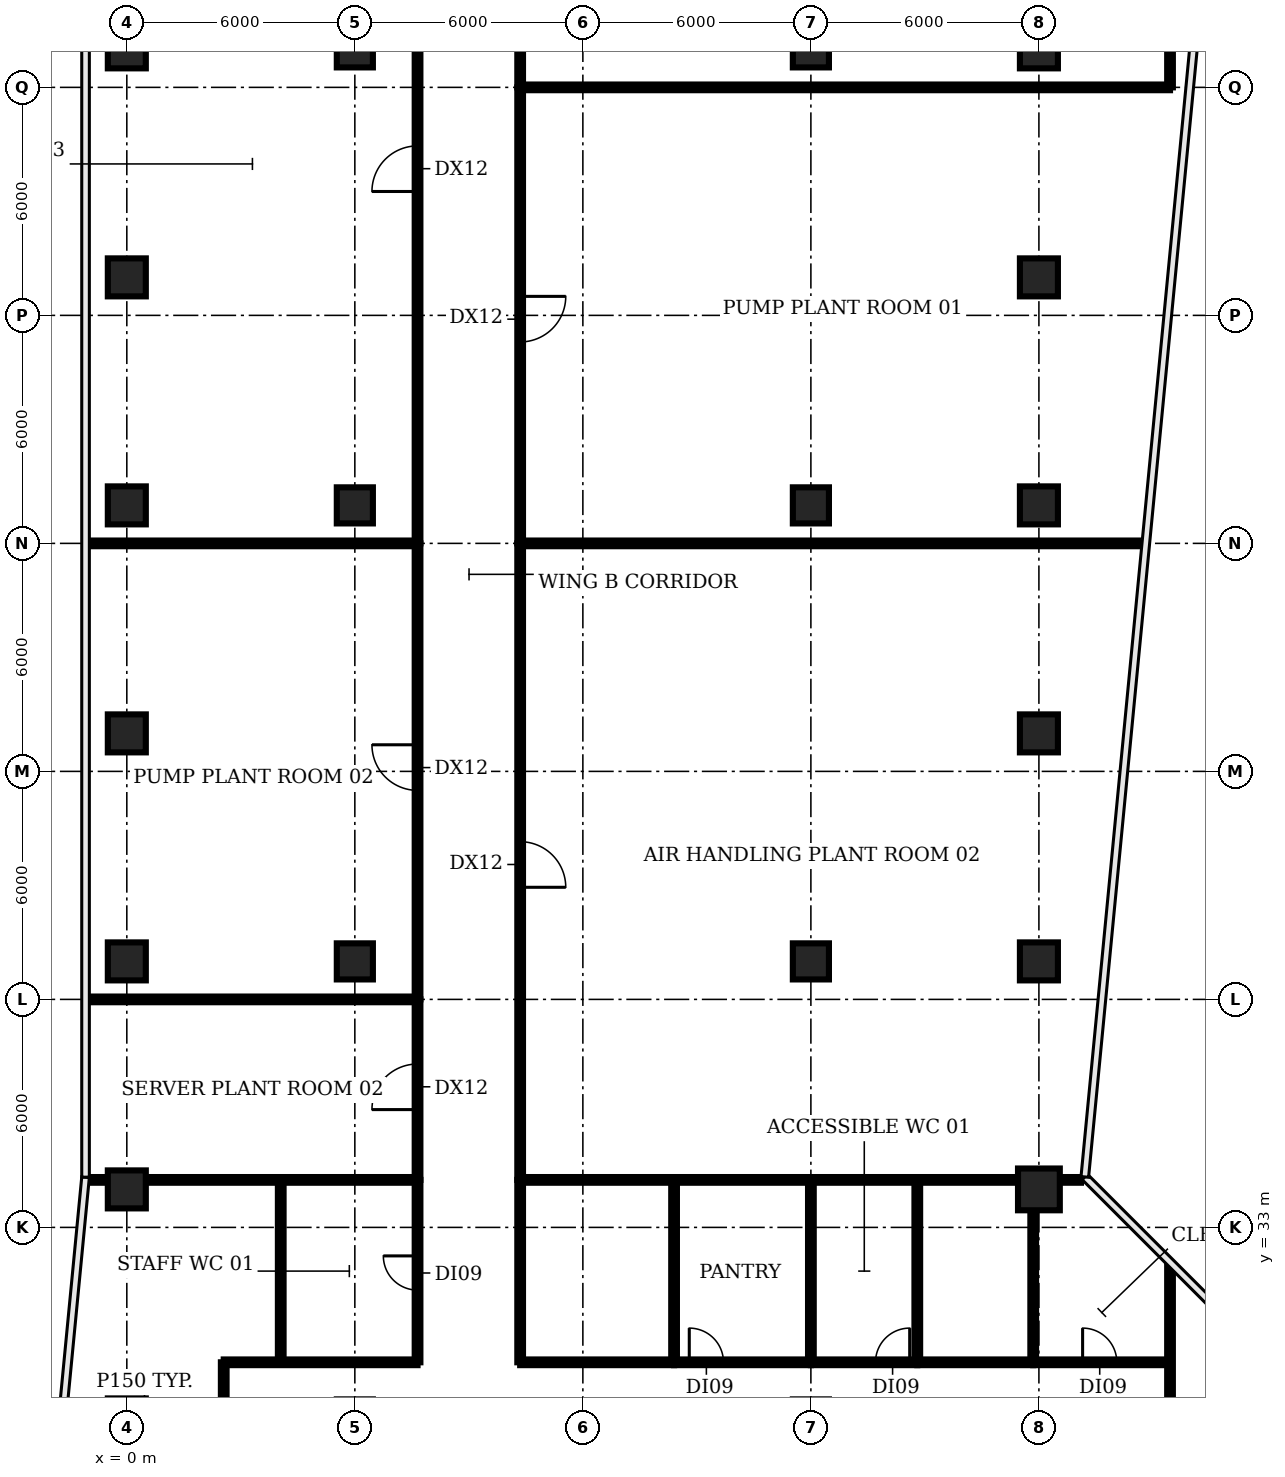
"""IFC4 building model, lengths in metres.
Left out: names, types, materials, properties, quantities, classifications, styles, units other than length and angle.
Written with IfcOpenShell. Run it as: python <this file> out.ifc"""

import sys

from ifc_helpers import new_model, si_unit, direction, frame, frame_2d, origin, origin_2d, place, context, subcontext, project, spatial, rectangle, circle, extrude, element, fill, save


model = new_model("IFC4")
c1 = context("Model", 3, precision=1e-05, world=origin(), true_north=direction((0.0, 1.0)))
c2 = subcontext(c1, "Body", "Model", "MODEL_VIEW")
j1 = project(units=[si_unit("LENGTHUNIT", "METRE"), si_unit("PLANEANGLEUNIT", "RADIAN")], contexts=[c1])
p1 = place(None, origin())
s1 = spatial("IfcSite", under=j1, at=p1, CompositionType="ELEMENT")
p2 = place(p1, origin())
s2 = spatial("IfcBuilding", under=s1, at=p2, CompositionType="ELEMENT")
p3 = place(p2, frame((0.0, 0.0, 134.0)))
s3 = spatial("IfcBuildingStorey", under=s2, at=p3, CompositionType="ELEMENT", Elevation=134.0)
for number, where, z_axis, x_axis in (
    (1, (0.0, 34.0, 0.0), (0.0, 0.0, 1.0), (1.0, 0.0, 0.0)),
    (2, (0.0, 40.0, 0.0), (0.0, 0.0, 1.0), (1.0, 0.0, 0.0)),
    (3, (0.0, 46.0, 0.0), (0.0, 0.0, 1.0), (1.0, 0.0, 0.0)),
    (4, (0.0, 52.0, 0.0), (0.0, 0.0, 1.0), (1.0, 0.0, 0.0)),
    (5, (0.0, 58.0, 0.0), (0.0, 0.0, 1.0), (1.0, 0.0, 0.0)),
    (6, (0.0, 64.0, 0.0), (0.0, 0.0, 1.0), (1.0, 0.0, 0.0)),
):
    element("IfcColumn", number, at=place(p3, frame(where, z_axis=z_axis, x_axis=x_axis)), inside=s3, PredefinedType="COLUMN", context=c2, shape_type="SweptSolid", body=[
        extrude(rectangle(XDim=1.0, YDim=1.0, at=origin_2d()), origin(), (0.0, 0.0, 1.0), 3.2),
    ])
for number, where, z_axis, x_axis in (
    (7, (6.0, 40.0, 0.0), (0.0, 0.0, 1.0), (1.0, 0.0, 0.0)),
    (8, (6.0, 52.0, 0.0), (0.0, 0.0, 1.0), (1.0, 0.0, 0.0)),
    (9, (6.0, 64.0, 0.0), (0.0, 0.0, 1.0), (1.0, 0.0, 0.0)),
    (10, (18.0, 40.0, 0.0), (0.0, 0.0, 1.0), (1.0, 0.0, 0.0)),
    (11, (18.0, 52.0, 0.0), (0.0, 0.0, 1.0), (1.0, 0.0, 0.0)),
    (12, (18.0, 64.0, 0.0), (0.0, 0.0, 1.0), (1.0, 0.0, 0.0)),
):
    element("IfcColumn", number, at=place(p3, frame(where, z_axis=z_axis, x_axis=x_axis)), inside=s3, PredefinedType="COLUMN", context=c2, shape_type="SweptSolid", body=[
        extrude(rectangle(XDim=0.95, YDim=0.95, at=origin_2d()), origin(), (0.0, 0.0, 1.0), 3.2),
    ])
p4 = place(p3, frame((24.0, 34.0, 0.0), z_axis=(0.0, 0.0, 1.0), x_axis=(1.0, 0.0, 0.0)))
e13 = element("IfcColumn", 13, at=p4, inside=s3, PredefinedType="COLUMN", context=c2, shape_type="SweptSolid", body=[
    extrude(circle(Radius=0.55, at=origin_2d()), origin(), (0.0, 0.0, 1.0), 3.2),
])
for number, where, z_axis, x_axis in (
    (14, (24.0, 40.0, 0.0), (0.0, 0.0, 1.0), (1.0, 0.0, 0.0)),
    (15, (24.0, 46.0, 0.0), (0.0, 0.0, 1.0), (1.0, 0.0, 0.0)),
    (16, (24.0, 52.0, 0.0), (0.0, 0.0, 1.0), (1.0, 0.0, 0.0)),
    (17, (24.0, 58.0, 0.0), (0.0, 0.0, 1.0), (1.0, 0.0, 0.0)),
    (18, (24.0, 64.0, 0.0), (0.0, 0.0, 1.0), (1.0, 0.0, 0.0)),
):
    element("IfcColumn", number, at=place(p3, frame(where, z_axis=z_axis, x_axis=x_axis)), inside=s3, PredefinedType="COLUMN", context=c2, shape_type="SweptSolid", body=[
        extrude(rectangle(XDim=1.0, YDim=1.0, at=origin_2d()), origin(), (0.0, 0.0, 1.0), 3.2),
    ])
p5 = place(p3, frame((-0.981, 34.25, 0.0), z_axis=(0.0, 0.0, 1.0), x_axis=(1.0, 0.0, 0.0)))
e19 = element("IfcWall", 19, at=p5, inside=s3, PredefinedType="PARTITIONING", context=c2, shape_type="SweptSolid", body=[
    extrude(rectangle(XDim=8.631, YDim=0.15, at=frame_2d((4.315, 0.0))), origin(), (0.0, 0.0, 1.0), 2.78),
])
for number, where, z_axis, x_axis in (
    (20, (-1.04, 39.0, 0.0), (0.0, 0.0, 1.0), (1.0, 0.0, 0.0)),
    (21, (-1.04, 51.0, 0.0), (0.0, 0.0, 1.0), (1.0, 0.0, 0.0)),
):
    element("IfcWall", number, at=place(p3, frame(where, z_axis=z_axis, x_axis=x_axis)), inside=s3, PredefinedType="PARTITIONING", context=c2, shape_type="SweptSolid", body=[
        extrude(rectangle(XDim=8.69, YDim=0.15, at=frame_2d((4.345, 0.0))), origin(), (0.0, 0.0, 1.0), 2.78),
    ])
p6 = place(p3, frame((2.55, 28.25, 0.0), z_axis=(0.0, 0.0, 1.0), x_axis=(0.0, 1.0, 0.0)))
e22 = element("IfcWall", 22, at=p6, inside=s3, PredefinedType="PARTITIONING", context=c2, shape_type="SweptSolid", body=[
    extrude(rectangle(XDim=1.2, YDim=0.15, at=frame_2d((0.6, 0.0))), origin(), (0.0, 0.0, 1.0), 2.78),
])
p7 = place(p3, frame((2.55, 29.45, 0.0), z_axis=(0.0, 0.0, 1.0), x_axis=(1.0, 0.0, 0.0)))
e23 = element("IfcWall", 23, at=p7, inside=s3, PredefinedType="PARTITIONING", context=c2, shape_type="SweptSolid", body=[
    extrude(rectangle(XDim=5.1, YDim=0.15, at=frame_2d((2.55, 0.0))), origin(), (0.0, 0.0, 1.0), 2.78),
])
p8 = place(p3, frame((4.05, 29.45, 0.0), z_axis=(0.0, 0.0, 1.0), x_axis=(0.0, 1.0, 0.0)))
e24 = element("IfcWall", 24, at=p8, inside=s3, PredefinedType="PARTITIONING", context=c2, shape_type="SweptSolid", body=[
    extrude(rectangle(XDim=4.8, YDim=0.15, at=frame_2d((2.4, 0.0))), origin(), (0.0, 0.0, 1.0), 2.78),
])
p9 = place(p3, frame((7.65, 29.45, 0.0), z_axis=(0.0, 0.0, 1.0), x_axis=(0.0, 1.0, 0.0)))
e25 = element("IfcWall", 25, at=p9, inside=s3, PredefinedType="PARTITIONING", context=c2, shape_type="SweptSolid", body=[
    extrude(rectangle(XDim=4.8, YDim=0.15, at=frame_2d((2.4, 0.0))), origin(), (0.0, 0.0, 1.0), 2.78),
])
p10 = place(p9, frame((1.9, 0.0, 0.0)))
e26 = element("IfcOpeningElement", 26, at=p10, cuts=e25, PredefinedType="OPENING", context=c2, shape_type="SweptSolid", body=[
    extrude(rectangle(XDim=0.9, YDim=2.1, at=frame_2d((0.45, 1.05))), frame((0.0, 0.085, 0.0), z_axis=(0.0, -1.0, 0.0), x_axis=(1.0, 0.0, 0.0)), (0.0, 0.0, 1.0), 0.17),
])
p11 = place(p3, frame((7.65, 34.25, 0.0), z_axis=(0.0, 0.0, 1.0), x_axis=(0.0, 1.0, 0.0)))
e27 = element("IfcWall", 27, at=p11, inside=s3, PredefinedType="PARTITIONING", context=c2, shape_type="SweptSolid", body=[
    extrude(rectangle(XDim=4.75, YDim=0.15, at=frame_2d((2.375, 0.0))), origin(), (0.0, 0.0, 1.0), 2.78),
])
p12 = place(p11, frame((1.85, 0.0, 0.0)))
e28 = element("IfcOpeningElement", 28, at=p12, cuts=e27, PredefinedType="OPENING", context=c2, shape_type="SweptSolid", body=[
    extrude(rectangle(XDim=1.2, YDim=2.1, at=frame_2d((0.6, 1.05))), frame((0.0, 0.085, 0.0), z_axis=(0.0, -1.0, 0.0), x_axis=(1.0, 0.0, 0.0)), (0.0, 0.0, 1.0), 0.17),
])
p13 = place(p3, frame((7.65, 39.0, 0.0), z_axis=(0.0, 0.0, 1.0), x_axis=(0.0, 1.0, 0.0)))
e29 = element("IfcWall", 29, at=p13, inside=s3, PredefinedType="PARTITIONING", context=c2, shape_type="SweptSolid", body=[
    extrude(rectangle(XDim=12.0, YDim=0.15, at=frame_2d((6.0, 0.0))), origin(), (0.0, 0.0, 1.0), 2.78),
])
p14 = place(p13, frame((5.5, 0.0, 0.0)))
e30 = element("IfcOpeningElement", 30, at=p14, cuts=e29, PredefinedType="OPENING", context=c2, shape_type="SweptSolid", body=[
    extrude(rectangle(XDim=1.2, YDim=2.1, at=frame_2d((0.6, 1.05))), frame((0.0, 0.085, 0.0), z_axis=(0.0, -1.0, 0.0), x_axis=(1.0, 0.0, 0.0)), (0.0, 0.0, 1.0), 0.17),
])
p15 = place(p3, frame((7.65, 51.0, 0.0), z_axis=(0.0, 0.0, 1.0), x_axis=(0.0, 1.0, 0.0)))
e31 = element("IfcWall", 31, at=p15, inside=s3, PredefinedType="PARTITIONING", context=c2, shape_type="SweptSolid", body=[
    extrude(rectangle(XDim=19.96, YDim=0.15, at=frame_2d((9.98, 0.0))), origin(), (0.0, 0.0, 1.0), 2.78),
])
p16 = place(p15, frame((9.26, 0.0, 0.0)))
e32 = element("IfcOpeningElement", 32, at=p16, cuts=e31, PredefinedType="OPENING", context=c2, shape_type="SweptSolid", body=[
    extrude(rectangle(XDim=1.2, YDim=2.1, at=frame_2d((0.6, 1.05))), frame((0.0, 0.085, 0.0), z_axis=(0.0, -1.0, 0.0), x_axis=(1.0, 0.0, 0.0)), (0.0, 0.0, 1.0), 0.17),
])
p17 = place(p3, frame((10.35, 29.45, 0.0), z_axis=(0.0, 0.0, 1.0), x_axis=(0.0, 1.0, 0.0)))
e33 = element("IfcWall", 33, at=p17, inside=s3, PredefinedType="PARTITIONING", context=c2, shape_type="SweptSolid", body=[
    extrude(rectangle(XDim=4.8, YDim=0.15, at=frame_2d((2.4, 0.0))), origin(), (0.0, 0.0, 1.0), 2.78),
])
p18 = place(p3, frame((10.35, 29.45, 0.0), z_axis=(0.0, 0.0, 1.0), x_axis=(1.0, 0.0, 0.0)))
e34 = element("IfcWall", 34, at=p18, inside=s3, PredefinedType="PARTITIONING", context=c2, shape_type="SweptSolid", body=[
    extrude(rectangle(XDim=4.05, YDim=0.15, at=frame_2d((2.025, 0.0))), origin(), (0.0, 0.0, 1.0), 2.78),
])
p19 = place(p3, frame((10.35, 34.25, 0.0), z_axis=(0.0, 0.0, 1.0), x_axis=(1.0, 0.0, 0.0)))
e35 = element("IfcWall", 35, at=p19, inside=s3, PredefinedType="PARTITIONING", context=c2, shape_type="SweptSolid", body=[
    extrude(rectangle(XDim=14.756, YDim=0.15, at=frame_2d((7.378, 0.0))), origin(), (0.0, 0.0, 1.0), 2.78),
])
p20 = place(p3, frame((10.35, 51.0, 0.0), z_axis=(0.0, 0.0, 1.0), x_axis=(0.0, -1.0, 0.0)))
e36 = element("IfcWall", 36, at=p20, inside=s3, PredefinedType="PARTITIONING", context=c2, shape_type="SweptSolid", body=[
    extrude(rectangle(XDim=16.75, YDim=0.15, at=frame_2d((8.375, 0.0))), origin(), (0.0, 0.0, 1.0), 2.78),
])
p21 = place(p20, frame((7.85, 0.0, 0.0)))
e37 = element("IfcOpeningElement", 37, at=p21, cuts=e36, PredefinedType="OPENING", context=c2, shape_type="SweptSolid", body=[
    extrude(rectangle(XDim=1.2, YDim=2.1, at=frame_2d((0.6, 1.05))), frame((0.0, 0.085, 0.0), z_axis=(0.0, -1.0, 0.0), x_axis=(1.0, 0.0, 0.0)), (0.0, 0.0, 1.0), 0.17),
])
p22 = place(p3, frame((10.35, 51.0, 0.0), z_axis=(0.0, 0.0, 1.0), x_axis=(1.0, 0.0, 0.0)))
e38 = element("IfcWall", 38, at=p22, inside=s3, PredefinedType="PARTITIONING", context=c2, shape_type="SweptSolid", body=[
    extrude(rectangle(XDim=16.41, YDim=0.15, at=frame_2d((8.205, 0.0))), origin(), (0.0, 0.0, 1.0), 2.78),
])
p23 = place(p3, frame((10.35, 63.0, 0.0), z_axis=(0.0, 0.0, 1.0), x_axis=(0.0, -1.0, 0.0)))
e39 = element("IfcWall", 39, at=p23, inside=s3, PredefinedType="PARTITIONING", context=c2, shape_type="SweptSolid", body=[
    extrude(rectangle(XDim=12.0, YDim=0.15, at=frame_2d((6.0, 0.0))), origin(), (0.0, 0.0, 1.0), 2.78),
])
p24 = place(p23, frame((5.5, 0.0, 0.0)))
e40 = element("IfcOpeningElement", 40, at=p24, cuts=e39, PredefinedType="OPENING", context=c2, shape_type="SweptSolid", body=[
    extrude(rectangle(XDim=1.2, YDim=2.1, at=frame_2d((0.6, 1.05))), frame((0.0, 0.085, 0.0), z_axis=(0.0, -1.0, 0.0), x_axis=(1.0, 0.0, 0.0)), (0.0, 0.0, 1.0), 0.17),
])
p25 = place(p3, frame((10.35, 63.0, 0.0), z_axis=(0.0, 0.0, 1.0), x_axis=(1.0, 0.0, 0.0)))
e41 = element("IfcWall", 41, at=p25, inside=s3, PredefinedType="PARTITIONING", context=c2, shape_type="SweptSolid", body=[
    extrude(rectangle(XDim=17.1, YDim=0.15, at=frame_2d((8.55, 0.0))), origin(), (0.0, 0.0, 1.0), 2.78),
])
p26 = place(p3, frame((10.35, 70.91, 0.0), z_axis=(0.0, 0.0, 1.0), x_axis=(0.0, -1.0, 0.0)))
e42 = element("IfcWall", 42, at=p26, inside=s3, PredefinedType="PARTITIONING", context=c2, shape_type="SweptSolid", body=[
    extrude(rectangle(XDim=7.91, YDim=0.15, at=frame_2d((3.955, 0.0))), origin(), (0.0, 0.0, 1.0), 2.78),
])
p27 = place(p26, frame((3.21, 0.0, 0.0)))
e43 = element("IfcOpeningElement", 43, at=p27, cuts=e42, PredefinedType="OPENING", context=c2, shape_type="SweptSolid", body=[
    extrude(rectangle(XDim=1.2, YDim=2.1, at=frame_2d((0.6, 1.05))), frame((0.0, 0.085, 0.0), z_axis=(0.0, -1.0, 0.0), x_axis=(1.0, 0.0, 0.0)), (0.0, 0.0, 1.0), 0.17),
])
p28 = place(p3, frame((14.4, 29.45, 0.0), z_axis=(0.0, 0.0, 1.0), x_axis=(0.0, 1.0, 0.0)))
e44 = element("IfcWall", 44, at=p28, inside=s3, PredefinedType="PARTITIONING", context=c2, shape_type="SweptSolid", body=[
    extrude(rectangle(XDim=4.8, YDim=0.15, at=frame_2d((2.4, 0.0))), origin(), (0.0, 0.0, 1.0), 2.78),
])
p29 = place(p3, frame((14.4, 29.45, 0.0), z_axis=(0.0, 0.0, 1.0), x_axis=(1.0, 0.0, 0.0)))
e45 = element("IfcWall", 45, at=p29, inside=s3, PredefinedType="PARTITIONING", context=c2, shape_type="SweptSolid", body=[
    extrude(rectangle(XDim=3.6, YDim=0.15, at=frame_2d((1.8, 0.0))), origin(), (0.0, 0.0, 1.0), 2.78),
])
p30 = place(p29, frame((0.4, 0.0, 0.0)))
e46 = element("IfcOpeningElement", 46, at=p30, cuts=e45, PredefinedType="OPENING", context=c2, shape_type="SweptSolid", body=[
    extrude(rectangle(XDim=0.9, YDim=2.1, at=frame_2d((0.45, 1.05))), frame((0.0, 0.085, 0.0), z_axis=(0.0, -1.0, 0.0), x_axis=(1.0, 0.0, 0.0)), (0.0, 0.0, 1.0), 0.17),
])
p31 = place(p3, frame((18.0, 29.45, 0.0), z_axis=(0.0, 0.0, 1.0), x_axis=(0.0, 1.0, 0.0)))
e47 = element("IfcWall", 47, at=p31, inside=s3, PredefinedType="PARTITIONING", context=c2, shape_type="SweptSolid", body=[
    extrude(rectangle(XDim=4.8, YDim=0.15, at=frame_2d((2.4, 0.0))), origin(), (0.0, 0.0, 1.0), 2.78),
])
p32 = place(p3, frame((18.0, 29.45, 0.0), z_axis=(0.0, 0.0, 1.0), x_axis=(1.0, 0.0, 0.0)))
e48 = element("IfcWall", 48, at=p32, inside=s3, PredefinedType="PARTITIONING", context=c2, shape_type="SweptSolid", body=[
    extrude(rectangle(XDim=2.8, YDim=0.15, at=frame_2d((1.4, 0.0))), origin(), (0.0, 0.0, 1.0), 2.78),
])
p33 = place(p32, frame((1.7, 0.0, 0.0)))
e49 = element("IfcOpeningElement", 49, at=p33, cuts=e48, PredefinedType="OPENING", context=c2, shape_type="SweptSolid", body=[
    extrude(rectangle(XDim=0.9, YDim=2.1, at=frame_2d((0.45, 1.05))), frame((0.0, 0.085, 0.0), z_axis=(0.0, -1.0, 0.0), x_axis=(1.0, 0.0, 0.0)), (0.0, 0.0, 1.0), 0.17),
])
p34 = place(p3, frame((20.8, 29.45, 0.0), z_axis=(0.0, 0.0, 1.0), x_axis=(0.0, 1.0, 0.0)))
e50 = element("IfcWall", 50, at=p34, inside=s3, PredefinedType="PARTITIONING", context=c2, shape_type="SweptSolid", body=[
    extrude(rectangle(XDim=4.8, YDim=0.15, at=frame_2d((2.4, 0.0))), origin(), (0.0, 0.0, 1.0), 2.78),
])
p35 = place(p3, frame((20.8, 29.45, 0.0), z_axis=(0.0, 0.0, 1.0), x_axis=(1.0, 0.0, 0.0)))
e51 = element("IfcWall", 51, at=p35, inside=s3, PredefinedType="PARTITIONING", context=c2, shape_type="SweptSolid", body=[
    extrude(rectangle(XDim=3.05, YDim=0.15, at=frame_2d((1.525, 0.0))), origin(), (0.0, 0.0, 1.0), 2.78),
])
p36 = place(p3, frame((23.85, 29.45, 0.0), z_axis=(0.0, 0.0, 1.0), x_axis=(0.0, 1.0, 0.0)))
e52 = element("IfcWall", 52, at=p36, inside=s3, PredefinedType="PARTITIONING", context=c2, shape_type="SweptSolid", body=[
    extrude(rectangle(XDim=4.8, YDim=0.15, at=frame_2d((2.4, 0.0))), origin(), (0.0, 0.0, 1.0), 2.78),
])
p37 = place(p3, frame((23.85, 29.45, 0.0), z_axis=(0.0, 0.0, 1.0), x_axis=(1.0, 0.0, 0.0)))
e53 = element("IfcWall", 53, at=p37, inside=s3, PredefinedType="PARTITIONING", context=c2, shape_type="SweptSolid", body=[
    extrude(rectangle(XDim=3.6, YDim=0.15, at=frame_2d((1.8, 0.0))), origin(), (0.0, 0.0, 1.0), 2.78),
])
p38 = place(p37, frame((1.3, 0.0, 0.0)))
e54 = element("IfcOpeningElement", 54, at=p38, cuts=e53, PredefinedType="OPENING", context=c2, shape_type="SweptSolid", body=[
    extrude(rectangle(XDim=0.9, YDim=2.1, at=frame_2d((0.45, 1.05))), frame((0.0, 0.085, 0.0), z_axis=(0.0, -1.0, 0.0), x_axis=(1.0, 0.0, 0.0)), (0.0, 0.0, 1.0), 0.17),
])
p39 = place(p3, frame((27.45, 25.55, 0.0), z_axis=(0.0, 0.0, 1.0), x_axis=(0.0, 1.0, 0.0)))
e55 = element("IfcWall", 55, at=p39, inside=s3, PredefinedType="PARTITIONING", context=c2, shape_type="SweptSolid", body=[
    extrude(rectangle(XDim=6.47, YDim=0.15, at=frame_2d((3.235, 0.0))), origin(), (0.0, 0.0, 1.0), 2.78),
])
p40 = place(p3, frame((27.45, 63.0, 0.0), z_axis=(0.0, 0.0, 1.0), x_axis=(0.0, 1.0, 0.0)))
e56 = element("IfcWall", 56, at=p40, inside=s3, PredefinedType="PARTITIONING", context=c2, shape_type="SweptSolid", body=[
    extrude(rectangle(XDim=7.65, YDim=0.15, at=frame_2d((3.825, 0.0))), origin(), (0.0, 0.0, 1.0), 2.78),
])
p41 = place(p10, origin())
e57 = element("IfcDoor", 57, at=p41, inside=s3, OperationType="SINGLE_SWING_RIGHT", PredefinedType="DOOR", context=c2, shape_type="SweptSolid", body=[
    extrude(rectangle(XDim=0.9, YDim=2.1, at=frame_2d((0.45, 1.05))), frame((0.0, 0.025, 0.0), z_axis=(0.0, -1.0, 0.0), x_axis=(1.0, 0.0, 0.0)), (0.0, 0.0, 1.0), 0.05),
])
fill(e26, e57)
p42 = place(p12, origin())
e58 = element("IfcDoor", 58, at=p42, inside=s3, OperationType="SINGLE_SWING_LEFT", PredefinedType="DOOR", context=c2, shape_type="SweptSolid", body=[
    extrude(rectangle(XDim=1.2, YDim=2.1, at=frame_2d((0.6, 1.05))), frame((0.0, 0.025, 0.0), z_axis=(0.0, -1.0, 0.0), x_axis=(1.0, 0.0, 0.0)), (0.0, 0.0, 1.0), 0.05),
])
fill(e28, e58)
p43 = place(p14, origin())
e59 = element("IfcDoor", 59, at=p43, inside=s3, OperationType="SINGLE_SWING_RIGHT", PredefinedType="DOOR", context=c2, shape_type="SweptSolid", body=[
    extrude(rectangle(XDim=1.2, YDim=2.1, at=frame_2d((0.6, 1.05))), frame((0.0, 0.025, 0.0), z_axis=(0.0, -1.0, 0.0), x_axis=(1.0, 0.0, 0.0)), (0.0, 0.0, 1.0), 0.05),
])
fill(e30, e59)
p44 = place(p16, origin())
e60 = element("IfcDoor", 60, at=p44, inside=s3, OperationType="SINGLE_SWING_LEFT", PredefinedType="DOOR", context=c2, shape_type="SweptSolid", body=[
    extrude(rectangle(XDim=1.2, YDim=2.1, at=frame_2d((0.6, 1.05))), frame((0.0, 0.025, 0.0), z_axis=(0.0, -1.0, 0.0), x_axis=(1.0, 0.0, 0.0)), (0.0, 0.0, 1.0), 0.05),
])
fill(e32, e60)
p45 = place(p21, origin())
e61 = element("IfcDoor", 61, at=p45, inside=s3, OperationType="SINGLE_SWING_RIGHT", PredefinedType="DOOR", context=c2, shape_type="SweptSolid", body=[
    extrude(rectangle(XDim=1.2, YDim=2.1, at=frame_2d((0.6, 1.05))), frame((0.0, 0.025, 0.0), z_axis=(0.0, -1.0, 0.0), x_axis=(1.0, 0.0, 0.0)), (0.0, 0.0, 1.0), 0.05),
])
fill(e37, e61)
p46 = place(p24, origin())
e62 = element("IfcDoor", 62, at=p46, inside=s3, OperationType="SINGLE_SWING_LEFT", PredefinedType="DOOR", context=c2, shape_type="SweptSolid", body=[
    extrude(rectangle(XDim=1.2, YDim=2.1, at=frame_2d((0.6, 1.05))), frame((0.0, 0.025, 0.0), z_axis=(0.0, -1.0, 0.0), x_axis=(1.0, 0.0, 0.0)), (0.0, 0.0, 1.0), 0.05),
])
fill(e40, e62)
p47 = place(p30, origin())
e63 = element("IfcDoor", 63, at=p47, inside=s3, OperationType="SINGLE_SWING_LEFT", PredefinedType="DOOR", context=c2, shape_type="SweptSolid", body=[
    extrude(rectangle(XDim=0.9, YDim=2.1, at=frame_2d((0.45, 1.05))), frame((0.0, 0.025, 0.0), z_axis=(0.0, -1.0, 0.0), x_axis=(1.0, 0.0, 0.0)), (0.0, 0.0, 1.0), 0.05),
])
fill(e46, e63)
p48 = place(p33, origin())
e64 = element("IfcDoor", 64, at=p48, inside=s3, OperationType="SINGLE_SWING_RIGHT", PredefinedType="DOOR", context=c2, shape_type="SweptSolid", body=[
    extrude(rectangle(XDim=0.9, YDim=2.1, at=frame_2d((0.45, 1.05))), frame((0.0, 0.025, 0.0), z_axis=(0.0, -1.0, 0.0), x_axis=(1.0, 0.0, 0.0)), (0.0, 0.0, 1.0), 0.05),
])
fill(e49, e64)
p49 = place(p38, origin())
e65 = element("IfcDoor", 65, at=p49, inside=s3, OperationType="SINGLE_SWING_LEFT", PredefinedType="DOOR", context=c2, shape_type="SweptSolid", body=[
    extrude(rectangle(XDim=0.9, YDim=2.1, at=frame_2d((0.45, 1.05))), frame((0.0, 0.025, 0.0), z_axis=(0.0, -1.0, 0.0), x_axis=(1.0, 0.0, 0.0)), (0.0, 0.0, 1.0), 0.05),
])
fill(e54, e65)
save(model, sys.argv[1])
